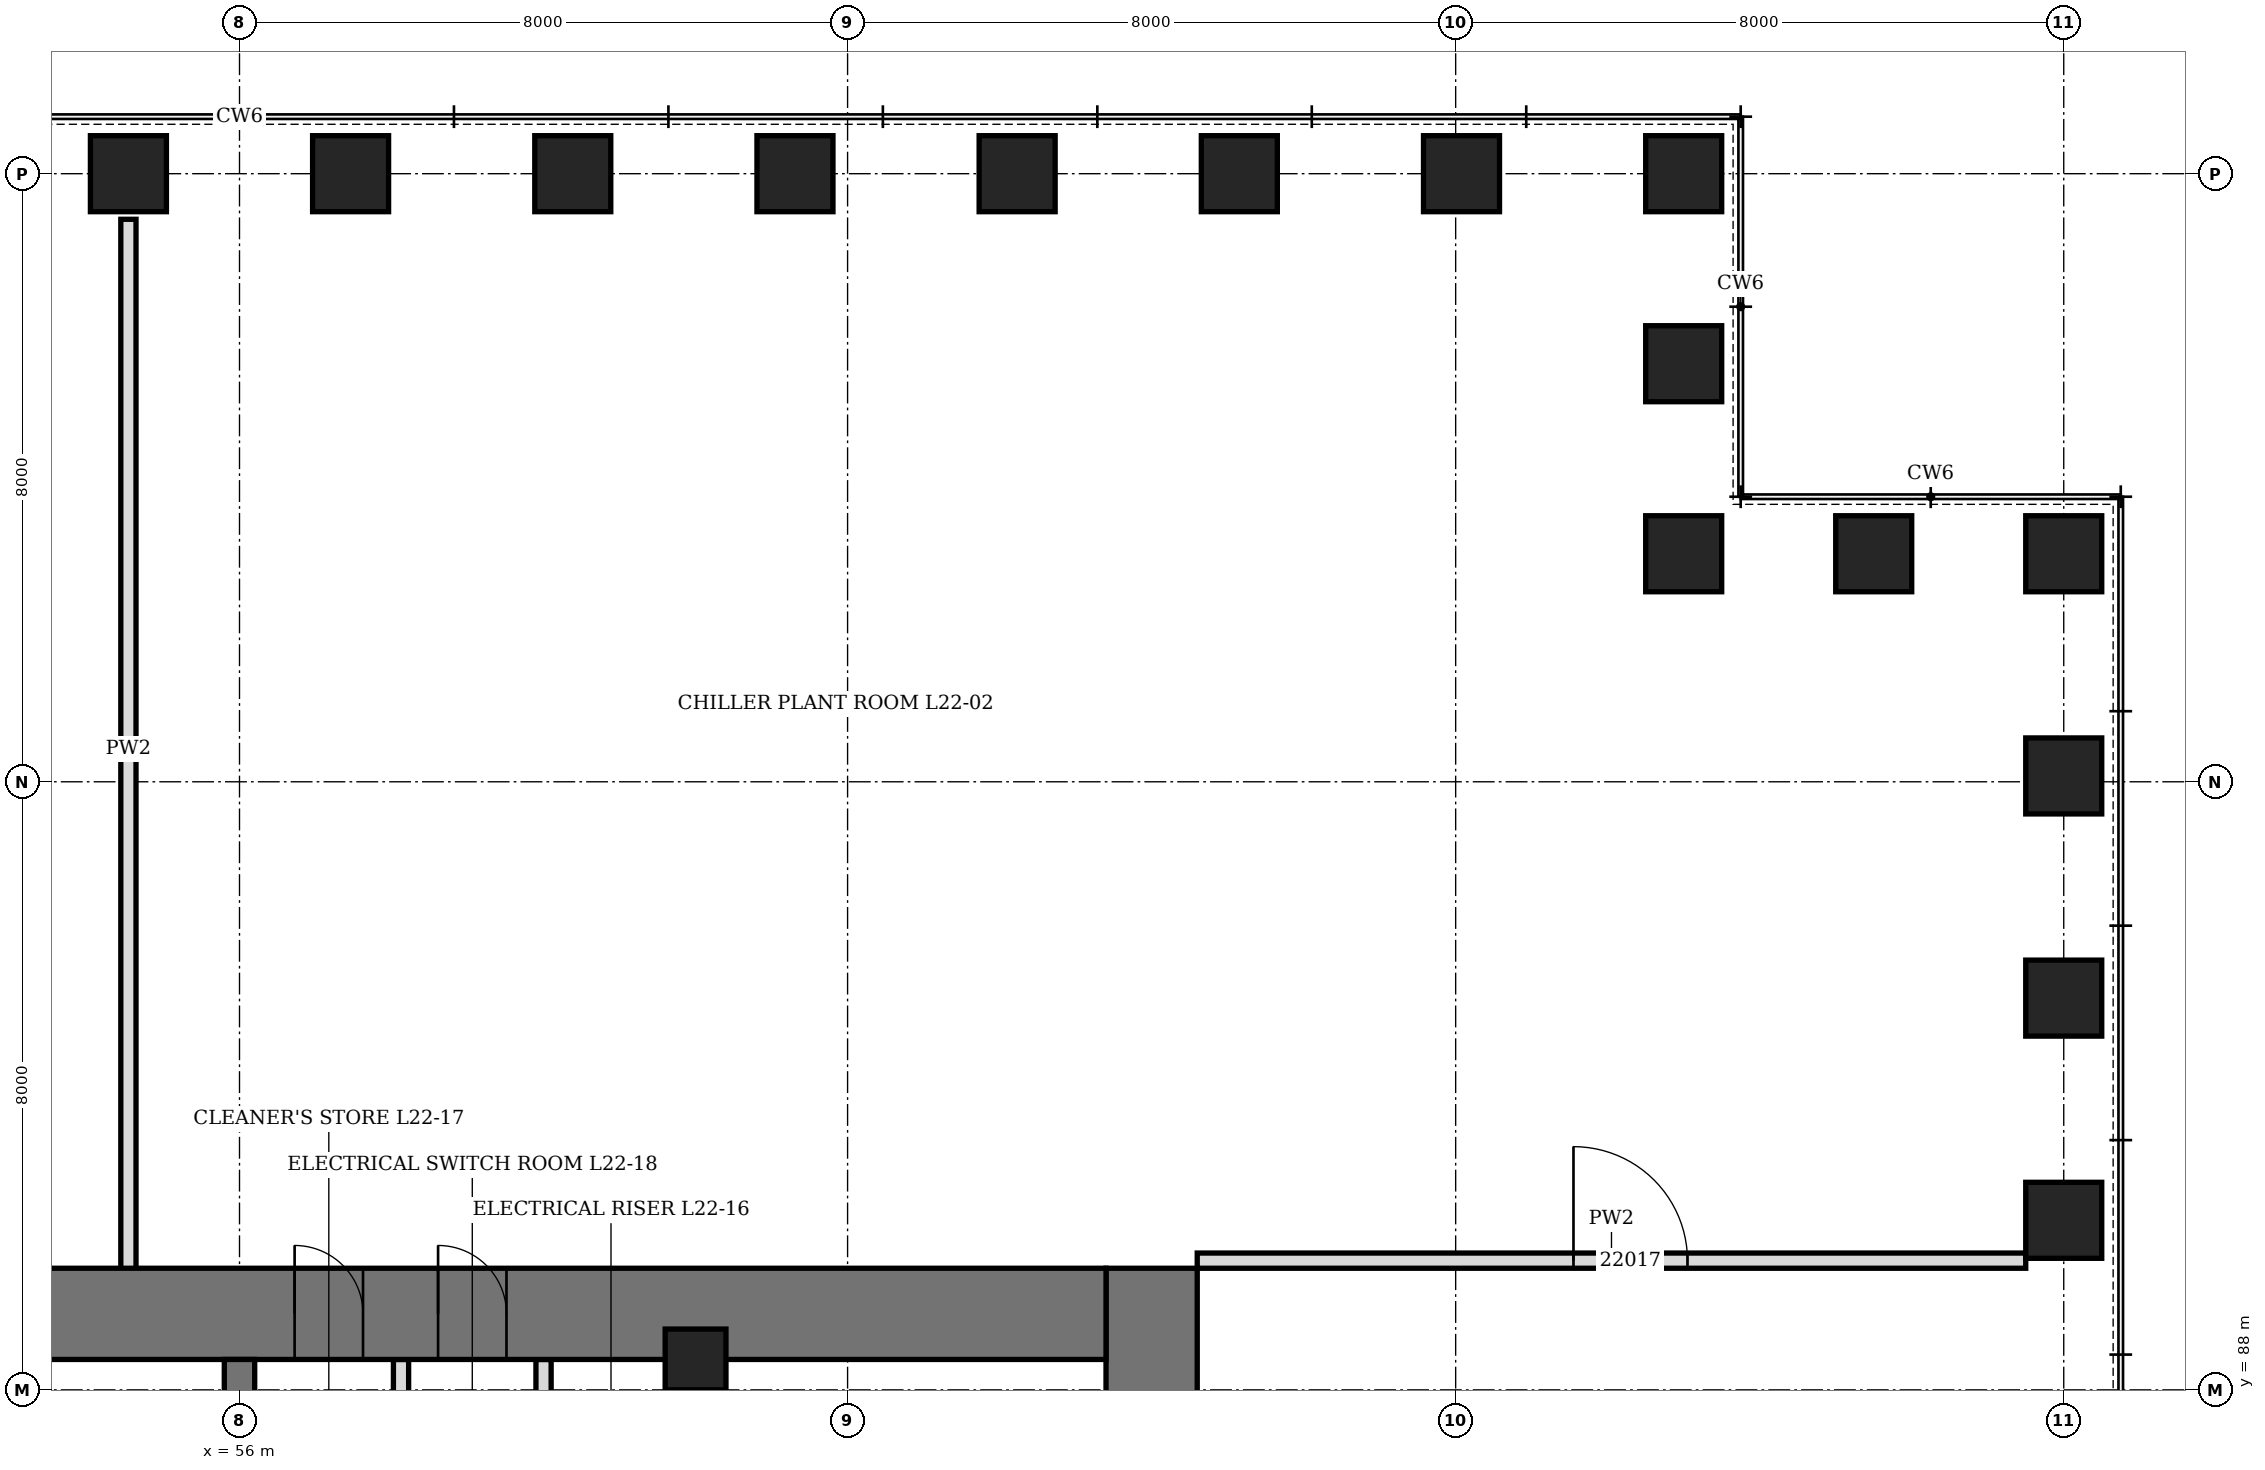
"""IFC4 building model, lengths in metres.
Left out: names, types, materials, properties, quantities, classifications, styles, units other than length and angle.
Written with IfcOpenShell. Run it as: python <this file> out.ifc"""

import sys

from ifc_helpers import new_model, si_unit, direction, frame, frame_2d, origin, origin_2d, place, context, subcontext, project, spatial, rectangle, hollow_rectangle, extrude, element, fill, save


model = new_model("IFC4")
c1 = context("Model", 3, precision=1e-05, world=origin(), true_north=direction((0.0, 1.0)))
c2 = subcontext(c1, "Body", "Model", "MODEL_VIEW")
j1 = project(units=[si_unit("LENGTHUNIT", "METRE"), si_unit("PLANEANGLEUNIT", "RADIAN")], contexts=[c1])
p1 = place(None, origin())
s1 = spatial("IfcSite", under=j1, at=p1, CompositionType="ELEMENT")
p2 = place(p1, origin())
s2 = spatial("IfcBuilding", under=s1, at=p2, CompositionType="ELEMENT")
p3 = place(p2, frame((0.0, 0.0, 102.1)))
s3 = spatial("IfcBuildingStorey", under=s2, at=p3, CompositionType="ELEMENT", Elevation=102.1)
for number, where, z_axis, x_axis in (
    (1, (80.0, 90.231, 0.0), (0.0, 0.0, 1.0), (0.0, 1.0, 0.0)),
    (2, (80.0, 93.154, 0.0), (0.0, 0.0, 1.0), (0.0, 1.0, 0.0)),
    (3, (80.0, 96.077, 0.0), (0.0, 0.0, 1.0), (0.0, 1.0, 0.0)),
    (4, (80.0, 99.0, 0.0), (0.0, 0.0, 1.0), (1.0, 0.0, 0.0)),
    (5, (77.5, 99.0, 0.0), (0.0, 0.0, 1.0), (1.0, 0.0, 0.0)),
    (6, (75.0, 99.0, 0.0), (0.0, 0.0, 1.0), (0.0, 1.0, 0.0)),
    (7, (75.0, 101.5, 0.0), (0.0, 0.0, 1.0), (0.0, 1.0, 0.0)),
    (8, (75.0, 104.0, 0.0), (0.0, 0.0, 1.0), (1.0, 0.0, 0.0)),
    (9, (72.077, 104.0, 0.0), (0.0, 0.0, 1.0), (1.0, 0.0, 0.0)),
    (10, (69.154, 104.0, 0.0), (0.0, 0.0, 1.0), (1.0, 0.0, 0.0)),
    (11, (66.231, 104.0, 0.0), (0.0, 0.0, 1.0), (1.0, 0.0, 0.0)),
    (12, (63.308, 104.0, 0.0), (0.0, 0.0, 1.0), (1.0, 0.0, 0.0)),
    (13, (60.385, 104.0, 0.0), (0.0, 0.0, 1.0), (1.0, 0.0, 0.0)),
    (14, (57.461, 104.0, 0.0), (0.0, 0.0, 1.0), (1.0, 0.0, 0.0)),
    (15, (54.539, 104.0, 0.0), (0.0, 0.0, 1.0), (1.0, 0.0, 0.0)),
):
    element("IfcColumn", number, at=place(p3, frame(where, z_axis=z_axis, x_axis=x_axis)), inside=s3, PredefinedType="COLUMN", context=c2, shape_type="SweptSolid", body=[
        extrude(hollow_rectangle(XDim=1.0, YDim=1.0, WallThickness=0.35, at=origin_2d()), origin(), (0.0, 0.0, 1.0), 5.75),
    ])
p4 = place(p3, frame((68.0, 70.4, 0.0), z_axis=(0.0, 0.0, 1.0), x_axis=(0.0, 1.0, 0.0)))
e16 = element("IfcWall", 16, at=p4, inside=s3, PredefinedType="SHEAR", context=c2, shape_type="SweptSolid", body=[
    extrude(rectangle(XDim=19.2, YDim=1.2, at=frame_2d((9.6, 0.0))), origin(), (0.0, 0.0, 1.0), 6.0),
])
p5 = place(p4, frame((8.6, 0.0, 0.0)))
e17 = element("IfcOpeningElement", 17, at=p5, cuts=e16, PredefinedType="OPENING", context=c2, shape_type="SweptSolid", body=[
    extrude(rectangle(XDim=2.0, YDim=2.4, at=frame_2d((1.0, 1.2))), frame((0.0, 0.61, 0.0), z_axis=(0.0, -1.0, 0.0), x_axis=(1.0, 0.0, 0.0)), (0.0, 0.0, 1.0), 1.22),
])
p6 = place(p3, frame((44.6, 89.0, 0.0), z_axis=(0.0, 0.0, 1.0), x_axis=(1.0, 0.0, 0.0)))
e18 = element("IfcWall", 18, at=p6, inside=s3, PredefinedType="SHEAR", context=c2, shape_type="SweptSolid", body=[
    extrude(rectangle(XDim=22.8, YDim=1.2, at=frame_2d((11.4, 0.0))), origin(), (0.0, 0.0, 1.0), 6.0),
])
p7 = place(p6, frame((7.9, 0.0, 0.0)))
e19 = element("IfcOpeningElement", 19, at=p7, cuts=e18, PredefinedType="OPENING", context=c2, shape_type="SweptSolid", body=[
    extrude(rectangle(XDim=1.0, YDim=2.1, at=frame_2d((0.5, 1.05))), frame((0.0, 0.61, 0.0), z_axis=(0.0, -1.0, 0.0), x_axis=(1.0, 0.0, 0.0)), (0.0, 0.0, 1.0), 1.22),
])
p8 = place(p6, frame((12.125, 0.0, 0.0)))
e20 = element("IfcOpeningElement", 20, at=p8, cuts=e18, PredefinedType="OPENING", context=c2, shape_type="SweptSolid", body=[
    extrude(rectangle(XDim=0.9, YDim=2.1, at=frame_2d((0.45, 1.05))), frame((0.0, 0.61, 0.0), z_axis=(0.0, -1.0, 0.0), x_axis=(1.0, 0.0, 0.0)), (0.0, 0.0, 1.0), 1.22),
])
p9 = place(p6, frame((14.012, 0.0, 0.0)))
e21 = element("IfcOpeningElement", 21, at=p9, cuts=e18, PredefinedType="OPENING", context=c2, shape_type="SweptSolid", body=[
    extrude(rectangle(XDim=0.9, YDim=2.1, at=frame_2d((0.45, 1.05))), frame((0.0, 0.61, 0.0), z_axis=(0.0, -1.0, 0.0), x_axis=(1.0, 0.0, 0.0)), (0.0, 0.0, 1.0), 1.22),
])
p10 = place(p3, frame((62.0, 71.6, 0.0), z_axis=(0.0, 0.0, 1.0), x_axis=(0.0, 1.0, 0.0)))
e22 = element("IfcWall", 22, at=p10, inside=s3, PredefinedType="SHEAR", context=c2, shape_type="SweptSolid", body=[
    extrude(rectangle(XDim=16.8, YDim=0.65, at=frame_2d((8.4, 0.0))), origin(), (0.0, 0.0, 1.0), 6.0),
])
p11 = place(p10, frame((7.5, 0.0, 0.0)))
e23 = element("IfcOpeningElement", 23, at=p11, cuts=e22, PredefinedType="OPENING", context=c2, shape_type="SweptSolid", body=[
    extrude(rectangle(XDim=1.8, YDim=2.4, at=frame_2d((0.9, 1.2))), frame((0.0, 0.335, 0.0), z_axis=(0.0, -1.0, 0.0), x_axis=(1.0, 0.0, 0.0)), (0.0, 0.0, 1.0), 0.67),
])
p12 = place(p3, frame((56.0, 86.325, 0.0), z_axis=(0.0, 0.0, 1.0), x_axis=(0.0, 1.0, 0.0)))
e24 = element("IfcWall", 24, at=p12, inside=s3, PredefinedType="SHEAR", context=c2, shape_type="SweptSolid", body=[
    extrude(rectangle(XDim=2.075, YDim=0.4, at=frame_2d((1.038, 0.0))), origin(), (0.0, 0.0, 1.0), 6.0),
])
p13 = place(p3, frame((62.0, 88.4, 0.0), z_axis=(0.0, 0.0, 1.0), x_axis=(1.0, 0.0, 0.0)))
e25 = element("IfcColumn", 25, at=p13, inside=s3, PredefinedType="COLUMN", context=c2, shape_type="SweptSolid", body=[
    extrude(hollow_rectangle(XDim=0.8, YDim=0.8, WallThickness=0.1, at=origin_2d()), origin(), (0.0, 0.0, 1.0), 6.0),
])
p14 = place(p3, frame((60.0, 86.325, 0.0), z_axis=(0.0, 0.0, 1.0), x_axis=(0.0, 1.0, 0.0)))
e26 = element("IfcWall", 26, at=p14, inside=s3, PredefinedType="PARTITIONING", context=c2, shape_type="SweptSolid", body=[
    extrude(rectangle(XDim=2.075, YDim=0.2, at=frame_2d((1.038, 0.0))), origin(), (0.0, 0.0, 1.0), 5.75),
])
p15 = place(p14, frame((0.587, 0.0, 0.0)))
e27 = element("IfcOpeningElement", 27, at=p15, cuts=e26, PredefinedType="OPENING", context=c2, shape_type="SweptSolid", body=[
    extrude(rectangle(XDim=0.9, YDim=2.1, at=frame_2d((0.45, 1.05))), frame((0.0, 0.11, 0.0), z_axis=(0.0, -1.0, 0.0), x_axis=(1.0, 0.0, 0.0)), (0.0, 0.0, 1.0), 0.22),
])
p16 = place(p3, frame((58.125, 86.325, 0.0), z_axis=(0.0, 0.0, 1.0), x_axis=(0.0, 1.0, 0.0)))
e28 = element("IfcWall", 28, at=p16, inside=s3, PredefinedType="PARTITIONING", context=c2, shape_type="SweptSolid", body=[
    extrude(rectangle(XDim=2.075, YDim=0.2, at=frame_2d((1.038, 0.0))), origin(), (0.0, 0.0, 1.0), 5.75),
])
p17 = place(p3, frame((54.539, 89.45, 0.0), z_axis=(0.0, 0.0, 1.0), x_axis=(0.0, 1.0, 0.0)))
e29 = element("IfcWall", 29, at=p17, inside=s3, PredefinedType="PARTITIONING", context=c2, shape_type="SweptSolid", body=[
    extrude(rectangle(XDim=13.95, YDim=0.2, at=frame_2d((6.975, 0.0))), origin(), (0.0, 0.0, 1.0), 4.25),
])
p18 = place(p3, frame((68.6, 89.7, 0.0), z_axis=(0.0, 0.0, 1.0), x_axis=(1.0, 0.0, 0.0)))
e30 = element("IfcWall", 30, at=p18, inside=s3, PredefinedType="PARTITIONING", context=c2, shape_type="SweptSolid", body=[
    extrude(rectangle(XDim=10.9, YDim=0.2, at=frame_2d((5.45, 0.0))), origin(), (0.0, 0.0, 1.0), 4.25),
])
p19 = place(p18, frame((4.95, 0.0, 0.0)))
e31 = element("IfcOpeningElement", 31, at=p19, cuts=e30, PredefinedType="OPENING", context=c2, shape_type="SweptSolid", body=[
    extrude(rectangle(XDim=1.5, YDim=2.4, at=frame_2d((0.75, 1.2))), frame((0.0, 0.11, 0.0), z_axis=(0.0, -1.0, 0.0), x_axis=(1.0, 0.0, 0.0)), (0.0, 0.0, 1.0), 0.22),
])
p20 = place(p8, origin())
e32 = element("IfcDoor", 32, at=p20, inside=s3, OperationType="SINGLE_SWING_LEFT", PredefinedType="DOOR", context=c2, shape_type="SweptSolid", body=[
    extrude(rectangle(XDim=0.9, YDim=2.1, at=frame_2d((0.45, 1.05))), frame((0.0, 0.35, 0.0), z_axis=(0.0, -1.0, 0.0), x_axis=(1.0, 0.0, 0.0)), (0.0, 0.0, 1.0), 0.7),
])
fill(e20, e32)
p21 = place(p9, origin())
e33 = element("IfcDoor", 33, at=p21, inside=s3, OperationType="SINGLE_SWING_LEFT", PredefinedType="DOOR", context=c2, shape_type="SweptSolid", body=[
    extrude(rectangle(XDim=0.9, YDim=2.1, at=frame_2d((0.45, 1.05))), frame((0.0, 0.35, 0.0), z_axis=(0.0, -1.0, 0.0), x_axis=(1.0, 0.0, 0.0)), (0.0, 0.0, 1.0), 0.7),
])
fill(e21, e33)
p22 = place(p19, origin())
e34 = element("IfcDoor", 34, at=p22, inside=s3, OperationType="DOUBLE_DOOR_SINGLE_SWING", PredefinedType="DOOR", context=c2, shape_type="SweptSolid", body=[
    extrude(rectangle(XDim=1.5, YDim=2.4, at=frame_2d((0.75, 1.2))), frame((0.0, 0.1, 0.0), z_axis=(0.0, -1.0, 0.0), x_axis=(1.0, 0.0, 0.0)), (0.0, 0.0, 1.0), 0.199),
])
fill(e31, e34)
save(model, sys.argv[1])
